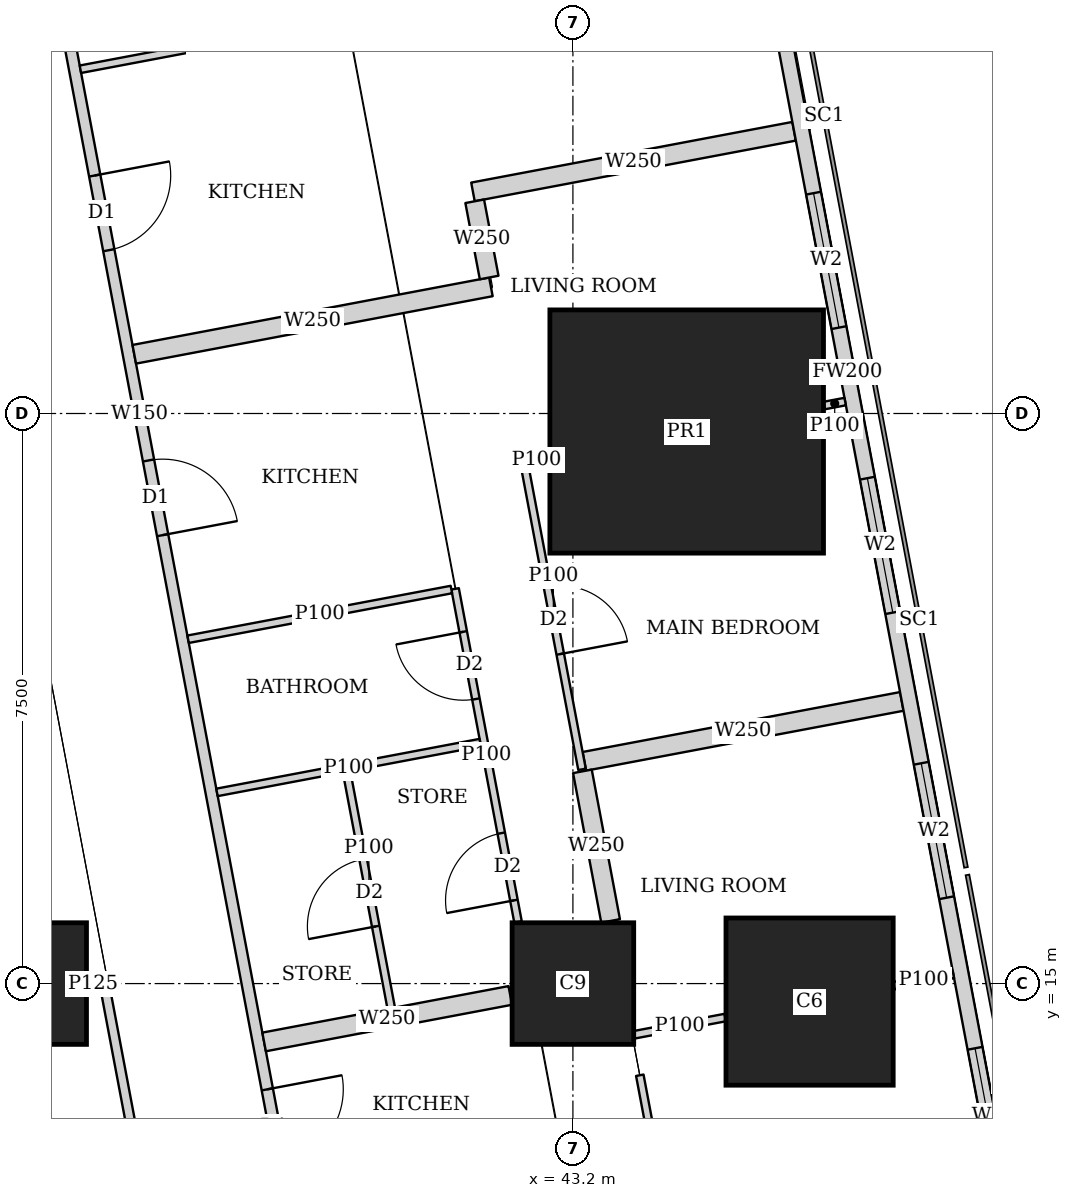
"""IFC4 building model, lengths in metres.
Left out: names, types, materials, properties, quantities, classifications, styles, units other than length and angle.
Written with IfcOpenShell. Run it as: python <this file> out.ifc"""

import sys

from ifc_helpers import new_model, si_unit, direction, frame, frame_2d, origin, origin_2d, place, context, subcontext, project, spatial, rectangle, extrude, element, fill, save


model = new_model("IFC4")
c1 = context("Model", 3, precision=1e-05, world=origin(), true_north=direction((0.0, 1.0)))
c2 = subcontext(c1, "Body", "Model", "MODEL_VIEW")
j1 = project(units=[si_unit("LENGTHUNIT", "METRE"), si_unit("PLANEANGLEUNIT", "RADIAN")], contexts=[c1])
p1 = place(None, origin())
s1 = spatial("IfcSite", under=j1, at=p1, CompositionType="ELEMENT")
p2 = place(p1, origin())
s2 = spatial("IfcBuilding", under=s1, at=p2, CompositionType="ELEMENT")
p3 = place(p2, frame((0.0, 0.0, 111.65)))
s3 = spatial("IfcBuildingStorey", under=s2, at=p3, CompositionType="ELEMENT", Elevation=111.65)
for number, where, z_axis, x_axis in (
    (1, (36.0, 15.0, 0.0), (0.0, 0.0, 1.0), (1.0, 0.0, 0.0)),
    (2, (43.2, 15.0, 0.0), (0.0, 0.0, 1.0), (1.0, 0.0, 0.0)),
):
    element("IfcColumn", number, at=place(p3, frame(where, z_axis=z_axis, x_axis=x_axis)), inside=s3, PredefinedType="COLUMN", context=c2, shape_type="SweptSolid", body=[
        extrude(rectangle(XDim=1.6, YDim=1.6, at=origin_2d()), origin(), (0.0, 0.0, 1.0), 3.75),
    ])
p4 = place(p3, frame((46.314, 14.763, 0.0), z_axis=(0.0, 0.0, 1.0), x_axis=(1.0, 0.0, 0.0)))
e3 = element("IfcColumn", 3, at=p4, inside=s3, PredefinedType="COLUMN", context=c2, shape_type="SweptSolid", body=[
    extrude(rectangle(XDim=2.2, YDim=2.2, at=origin_2d()), origin(), (0.0, 0.0, 1.0), 3.75),
])
p5 = place(p3, frame((44.697, 22.263, 0.0), z_axis=(0.0, 0.0, 1.0), x_axis=(1.0, 0.0, 0.0)))
e4 = element("IfcColumn", 4, at=p5, inside=s3, PredefinedType="COLUMN", context=c2, shape_type="SweptSolid", body=[
    extrude(rectangle(XDim=3.6, YDim=3.2, at=origin_2d()), origin(), (0.0, 0.0, 1.0), 3.75),
])
p6 = place(p3, frame((50.653, 2.703, 0.0), z_axis=(0.0, 0.0, 1.0), x_axis=(-0.185612026696, 0.982623109613, 0.0)))
e5 = element("IfcWall", 5, at=p6, inside=s3, PredefinedType="SOLIDWALL", context=c2, shape_type="SweptSolid", body=[
    extrude(rectangle(XDim=41.393, YDim=0.2, at=frame_2d((20.697, 0.0))), origin(), (0.0, 0.0, 1.0), 3.5),
])
p7 = place(p6, frame((1.633, 0.0, 0.9)))
e6 = element("IfcOpeningElement", 6, at=p7, cuts=e5, PredefinedType="OPENING", context=c2, shape_type="SweptSolid", body=[
    extrude(rectangle(XDim=1.8, YDim=1.5, at=frame_2d((0.9, 0.75))), frame((0.0, 0.11, 0.0), z_axis=(0.0, -1.0, 0.0), x_axis=(1.0, 0.0, 0.0)), (0.0, 0.0, 1.0), 0.22),
])
p8 = place(p6, frame((6.032, 0.0, 0.9)))
e7 = element("IfcOpeningElement", 7, at=p8, cuts=e5, PredefinedType="OPENING", context=c2, shape_type="SweptSolid", body=[
    extrude(rectangle(XDim=1.8, YDim=1.5, at=frame_2d((0.9, 0.75))), frame((0.0, 0.11, 0.0), z_axis=(0.0, -1.0, 0.0), x_axis=(1.0, 0.0, 0.0)), (0.0, 0.0, 1.0), 0.22),
])
p9 = place(p6, frame((9.848, 0.0, 0.9)))
e8 = element("IfcOpeningElement", 8, at=p9, cuts=e5, PredefinedType="OPENING", context=c2, shape_type="SweptSolid", body=[
    extrude(rectangle(XDim=1.8, YDim=1.5, at=frame_2d((0.9, 0.75))), frame((0.0, 0.11, 0.0), z_axis=(0.0, -1.0, 0.0), x_axis=(1.0, 0.0, 0.0)), (0.0, 0.0, 1.0), 0.22),
])
p10 = place(p6, frame((13.664, 0.0, 0.9)))
e9 = element("IfcOpeningElement", 9, at=p10, cuts=e5, PredefinedType="OPENING", context=c2, shape_type="SweptSolid", body=[
    extrude(rectangle(XDim=1.8, YDim=1.5, at=frame_2d((0.9, 0.75))), frame((0.0, 0.11, 0.0), z_axis=(0.0, -1.0, 0.0), x_axis=(1.0, 0.0, 0.0)), (0.0, 0.0, 1.0), 0.22),
])
p11 = place(p6, frame((17.481, 0.0, 0.9)))
e10 = element("IfcOpeningElement", 10, at=p11, cuts=e5, PredefinedType="OPENING", context=c2, shape_type="SweptSolid", body=[
    extrude(rectangle(XDim=1.8, YDim=1.5, at=frame_2d((0.9, 0.75))), frame((0.0, 0.11, 0.0), z_axis=(0.0, -1.0, 0.0), x_axis=(1.0, 0.0, 0.0)), (0.0, 0.0, 1.0), 0.22),
])
p12 = place(p6, frame((21.297, 0.0, 0.9)))
e11 = element("IfcOpeningElement", 11, at=p12, cuts=e5, PredefinedType="OPENING", context=c2, shape_type="SweptSolid", body=[
    extrude(rectangle(XDim=1.8, YDim=1.5, at=frame_2d((0.9, 0.75))), frame((0.0, 0.11, 0.0), z_axis=(0.0, -1.0, 0.0), x_axis=(1.0, 0.0, 0.0)), (0.0, 0.0, 1.0), 0.22),
])
p13 = place(p6, frame((25.113, 0.0, 0.9)))
e12 = element("IfcOpeningElement", 12, at=p13, cuts=e5, PredefinedType="OPENING", context=c2, shape_type="SweptSolid", body=[
    extrude(rectangle(XDim=1.8, YDim=1.5, at=frame_2d((0.9, 0.75))), frame((0.0, 0.11, 0.0), z_axis=(0.0, -1.0, 0.0), x_axis=(1.0, 0.0, 0.0)), (0.0, 0.0, 1.0), 0.22),
])
p14 = place(p6, frame((28.93, 0.0, 0.9)))
e13 = element("IfcOpeningElement", 13, at=p14, cuts=e5, PredefinedType="OPENING", context=c2, shape_type="SweptSolid", body=[
    extrude(rectangle(XDim=1.8, YDim=1.5, at=frame_2d((0.9, 0.75))), frame((0.0, 0.11, 0.0), z_axis=(0.0, -1.0, 0.0), x_axis=(1.0, 0.0, 0.0)), (0.0, 0.0, 1.0), 0.22),
])
p15 = place(p6, frame((32.746, 0.0, 0.9)))
e14 = element("IfcOpeningElement", 14, at=p15, cuts=e5, PredefinedType="OPENING", context=c2, shape_type="SweptSolid", body=[
    extrude(rectangle(XDim=1.8, YDim=1.5, at=frame_2d((0.9, 0.75))), frame((0.0, 0.11, 0.0), z_axis=(0.0, -1.0, 0.0), x_axis=(1.0, 0.0, 0.0)), (0.0, 0.0, 1.0), 0.22),
])
p16 = place(p6, frame((36.481, 0.0, 0.9)))
e15 = element("IfcOpeningElement", 15, at=p16, cuts=e5, PredefinedType="OPENING", context=c2, shape_type="SweptSolid", body=[
    extrude(rectangle(XDim=1.8, YDim=1.5, at=frame_2d((0.9, 0.75))), frame((0.0, 0.11, 0.0), z_axis=(0.0, -1.0, 0.0), x_axis=(1.0, 0.0, 0.0)), (0.0, 0.0, 1.0), 0.22),
])
p17 = place(p3, frame((33.127, 45.65, 0.0), z_axis=(0.0, 0.0, 1.0), x_axis=(0.185598547723, -0.98262565562, 0.0)))
e16 = element("IfcWall", 16, at=p17, inside=s3, PredefinedType="SOLIDWALL", context=c2, shape_type="SweptSolid", body=[
    extrude(rectangle(XDim=47.118, YDim=0.15, at=frame_2d((23.559, 0.0))), origin(), (0.0, 0.0, 1.0), 2.2),
])
p18 = place(p17, frame((20.373, 0.0, 0.0)))
e17 = element("IfcOpeningElement", 17, at=p18, cuts=e16, PredefinedType="OPENING", context=c2, shape_type="SweptSolid", body=[
    extrude(rectangle(XDim=1.0, YDim=2.1, at=frame_2d((0.5, 1.05))), frame((0.0, 0.085, 0.0), z_axis=(0.0, -1.0, 0.0), x_axis=(1.0, 0.0, 0.0)), (0.0, 0.0, 1.0), 0.17),
])
p19 = place(p17, frame((24.188, 0.0, 0.0)))
e18 = element("IfcOpeningElement", 18, at=p19, cuts=e16, PredefinedType="OPENING", context=c2, shape_type="SweptSolid", body=[
    extrude(rectangle(XDim=1.0, YDim=2.1, at=frame_2d((0.5, 1.05))), frame((0.0, 0.085, 0.0), z_axis=(0.0, -1.0, 0.0), x_axis=(1.0, 0.0, 0.0)), (0.0, 0.0, 1.0), 0.17),
])
p20 = place(p17, frame((32.608, 0.0, 0.0)))
e19 = element("IfcOpeningElement", 19, at=p20, cuts=e16, PredefinedType="OPENING", context=c2, shape_type="SweptSolid", body=[
    extrude(rectangle(XDim=1.0, YDim=2.1, at=frame_2d((0.5, 1.05))), frame((0.0, 0.085, 0.0), z_axis=(0.0, -1.0, 0.0), x_axis=(1.0, 0.0, 0.0)), (0.0, 0.0, 1.0), 0.17),
])
p21 = place(p3, frame((40.233, 27.693, 0.0), z_axis=(0.0, 0.0, 1.0), x_axis=(-0.982598214409, -0.185743772548, 0.0)))
e20 = element("IfcWall", 20, at=p21, inside=s3, PredefinedType="PARTITIONING", context=c2, shape_type="SweptSolid", body=[
    extrude(rectangle(XDim=3.575, YDim=0.1, at=frame_2d((1.788, 0.0))), origin(), (0.0, 0.0, 1.0), 3.5),
])
p22 = place(p3, frame((42.565, 21.809, 0.0), z_axis=(0.0, 0.0, 1.0), x_axis=(0.185910488551, -0.982566684885, 0.0)))
e21 = element("IfcWall", 21, at=p22, inside=s3, PredefinedType="PARTITIONING", context=c2, shape_type="SweptSolid", body=[
    extrude(rectangle(XDim=4.062, YDim=0.1, at=frame_2d((2.031, 0.0))), origin(), (0.0, 0.0, 1.0), 2.5),
])
p23 = place(p22, frame((1.618, 0.0, 0.0)))
e22 = element("IfcOpeningElement", 22, at=p23, cuts=e21, PredefinedType="OPENING", context=c2, shape_type="SweptSolid", body=[
    extrude(rectangle(XDim=0.9, YDim=2.1, at=frame_2d((0.45, 1.05))), frame((0.0, 0.06, 0.0), z_axis=(0.0, -1.0, 0.0), x_axis=(1.0, 0.0, 0.0)), (0.0, 0.0, 1.0), 0.12),
])
p24 = place(p3, frame((41.65, 20.193, 0.0), z_axis=(0.0, 0.0, 1.0), x_axis=(0.18565316258, -0.982615338382, 0.0)))
e23 = element("IfcWall", 23, at=p24, inside=s3, PredefinedType="PARTITIONING", context=c2, shape_type="SweptSolid", body=[
    extrude(rectangle(XDim=4.461, YDim=0.1, at=frame_2d((2.23, 0.0))), origin(), (0.0, 0.0, 1.0), 3.5),
])
p25 = place(p24, frame((0.575, 0.0, 0.0)))
e24 = element("IfcOpeningElement", 24, at=p25, cuts=e23, PredefinedType="OPENING", context=c2, shape_type="SweptSolid", body=[
    extrude(rectangle(XDim=0.9, YDim=2.1, at=frame_2d((0.45, 1.05))), frame((0.0, 0.06, 0.0), z_axis=(0.0, -1.0, 0.0), x_axis=(1.0, 0.0, 0.0)), (0.0, 0.0, 1.0), 0.12),
])
p26 = place(p24, frame((3.271, 0.0, 0.0)))
e25 = element("IfcOpeningElement", 25, at=p26, cuts=e23, PredefinedType="OPENING", context=c2, shape_type="SweptSolid", body=[
    extrude(rectangle(XDim=0.9, YDim=2.1, at=frame_2d((0.45, 1.05))), frame((0.0, 0.06, 0.0), z_axis=(0.0, -1.0, 0.0), x_axis=(1.0, 0.0, 0.0)), (0.0, 0.0, 1.0), 0.12),
])
p27 = place(p3, frame((46.782, 22.657, 0.0), z_axis=(0.0, 0.0, 1.0), x_axis=(-0.982574553168, -0.185868898601, 0.0)))
e26 = element("IfcWall", 26, at=p27, inside=s3, PredefinedType="PARTITIONING", context=c2, shape_type="SweptSolid", body=[
    extrude(rectangle(XDim=0.28, YDim=0.1, at=frame_2d((0.14, 0.0))), origin(), (0.0, 0.0, 1.0), 3.5),
])
p28 = place(p3, frame((42.887, 21.921, 0.0), z_axis=(0.0, 0.0, 1.0), x_axis=(-0.982274918032, -0.187445953293, 0.0)))
e27 = element("IfcWall", 27, at=p28, inside=s3, PredefinedType="PARTITIONING", context=c2, shape_type="SweptSolid", body=[
    extrude(rectangle(XDim=0.336, YDim=0.1, at=frame_2d((0.168, 0.0))), origin(), (0.0, 0.0, 1.0), 2.5),
])
p29 = place(p3, frame((41.601, 20.184, 0.0), z_axis=(0.0, 0.0, 1.0), x_axis=(-0.982638553676, -0.185530247748, 0.0)))
e28 = element("IfcWall", 28, at=p29, inside=s3, PredefinedType="PARTITIONING", context=c2, shape_type="SweptSolid", body=[
    extrude(rectangle(XDim=3.525, YDim=0.1, at=frame_2d((1.763, 0.0))), origin(), (0.0, 0.0, 1.0), 3.5),
])
p30 = place(p3, frame((41.981, 18.17, 0.0), z_axis=(0.0, 0.0, 1.0), x_axis=(-0.982585626838, -0.185810349366, 0.0)))
e29 = element("IfcWall", 29, at=p30, inside=s3, PredefinedType="PARTITIONING", context=c2, shape_type="SweptSolid", body=[
    extrude(rectangle(XDim=3.525, YDim=0.1, at=frame_2d((1.763, 0.0))), origin(), (0.0, 0.0, 1.0), 3.5),
])
p31 = place(p3, frame((46.11, 26.213, 0.0), z_axis=(0.0, 0.0, 1.0), x_axis=(-0.982633535512, -0.185556823879, 0.0)))
e30 = element("IfcWall", 30, at=p31, inside=s3, PredefinedType="SOLIDWALL", context=c2, shape_type="SweptSolid", body=[
    extrude(rectangle(XDim=4.3, YDim=0.25, at=frame_2d((2.15, 0.0))), origin(), (0.0, 0.0, 1.0), 2.2),
])
p32 = place(p3, frame((42.121, 24.166, 0.0), z_axis=(0.0, 0.0, 1.0), x_axis=(-0.98259850169, -0.185742252804, 0.0)))
e31 = element("IfcWall", 31, at=p32, inside=s3, PredefinedType="SOLIDWALL", context=c2, shape_type="SweptSolid", body=[
    extrude(rectangle(XDim=4.775, YDim=0.25, at=frame_2d((2.388, 0.0))), origin(), (0.0, 0.0, 1.0), 3.5),
])
p33 = place(p3, frame((41.908, 25.292, 0.0), z_axis=(0.0, 0.0, 1.0), x_axis=(0.18607888991, -0.982534806879, 0.0)))
e32 = element("IfcWall", 32, at=p33, inside=s3, PredefinedType="SOLIDWALL", context=c2, shape_type="SweptSolid", body=[
    extrude(rectangle(XDim=1.021, YDim=0.25, at=frame_2d((0.51, 0.0))), origin(), (0.0, 0.0, 1.0), 3.5),
])
p34 = place(p3, frame((44.08, 13.794, 0.0), z_axis=(0.0, 0.0, 1.0), x_axis=(0.185608455357, -0.982623784212, 0.0)))
e33 = element("IfcWall", 33, at=p34, inside=s3, PredefinedType="PARTITIONING", context=c2, shape_type="SweptSolid", body=[
    extrude(rectangle(XDim=10.909, YDim=0.1, at=frame_2d((5.455, 0.0))), origin(), (0.0, 0.0, 1.0), 3.5),
])
p35 = place(p34, frame((1.094, 0.0, 0.0)))
e34 = element("IfcOpeningElement", 34, at=p35, cuts=e33, PredefinedType="OPENING", context=c2, shape_type="SweptSolid", body=[
    extrude(rectangle(XDim=0.9, YDim=2.1, at=frame_2d((0.45, 1.05))), frame((0.0, 0.06, 0.0), z_axis=(0.0, -1.0, 0.0), x_axis=(1.0, 0.0, 0.0)), (0.0, 0.0, 1.0), 0.12),
])
p36 = place(p34, frame((3.639, 0.0, 0.0)))
e35 = element("IfcOpeningElement", 35, at=p36, cuts=e33, PredefinedType="OPENING", context=c2, shape_type="SweptSolid", body=[
    extrude(rectangle(XDim=0.9, YDim=2.1, at=frame_2d((0.45, 1.05))), frame((0.0, 0.06, 0.0), z_axis=(0.0, -1.0, 0.0), x_axis=(1.0, 0.0, 0.0)), (0.0, 0.0, 1.0), 0.12),
])
p37 = place(p34, frame((8.05, 0.0, 0.0)))
e36 = element("IfcOpeningElement", 36, at=p37, cuts=e33, PredefinedType="OPENING", context=c2, shape_type="SweptSolid", body=[
    extrude(rectangle(XDim=0.9, YDim=2.1, at=frame_2d((0.45, 1.05))), frame((0.0, 0.06, 0.0), z_axis=(0.0, -1.0, 0.0), x_axis=(1.0, 0.0, 0.0)), (0.0, 0.0, 1.0), 0.12),
])
p38 = place(p3, frame((48.206, 15.12, 0.0), z_axis=(0.0, 0.0, 1.0), x_axis=(-0.982512656401, -0.186195810938, 0.0)))
e37 = element("IfcWall", 37, at=p38, inside=s3, PredefinedType="PARTITIONING", context=c2, shape_type="SweptSolid", body=[
    extrude(rectangle(XDim=0.796, YDim=0.1, at=frame_2d((0.398, 0.0))), origin(), (0.0, 0.0, 1.0), 3.5),
])
p39 = place(p3, frame((45.204, 14.553, 0.0), z_axis=(0.0, 0.0, 1.0), x_axis=(-0.982545444659, -0.186022711461, 0.0)))
e38 = element("IfcWall", 38, at=p39, inside=s3, PredefinedType="PARTITIONING", context=c2, shape_type="SweptSolid", body=[
    extrude(rectangle(XDim=1.215, YDim=0.1, at=frame_2d((0.608, 0.0))), origin(), (0.0, 0.0, 1.0), 3.5),
])
p40 = place(p3, frame((47.527, 18.712, 0.0), z_axis=(0.0, 0.0, 1.0), x_axis=(-0.982665405803, -0.185387972203, 0.0)))
e39 = element("IfcWall", 39, at=p40, inside=s3, PredefinedType="SOLIDWALL", context=c2, shape_type="SweptSolid", body=[
    extrude(rectangle(XDim=4.25, YDim=0.25, at=frame_2d((2.125, 0.0))), origin(), (0.0, 0.0, 1.0), 2.2),
])
p41 = place(p3, frame((42.376, 14.844, 0.0), z_axis=(0.0, 0.0, 1.0), x_axis=(-0.982610440948, -0.18567908159, 0.0)))
e40 = element("IfcWall", 40, at=p41, inside=s3, PredefinedType="SOLIDWALL", context=c2, shape_type="SweptSolid", body=[
    extrude(rectangle(XDim=3.296, YDim=0.25, at=frame_2d((1.648, 0.0))), origin(), (0.0, 0.0, 1.0), 3.5),
])
p42 = place(p3, frame((43.325, 17.792, 0.0), z_axis=(0.0, 0.0, 1.0), x_axis=(0.185296805985, -0.982682600686, 0.0)))
e41 = element("IfcWall", 41, at=p42, inside=s3, PredefinedType="SOLIDWALL", context=c2, shape_type="SweptSolid", body=[
    extrude(rectangle(XDim=2.003, YDim=0.25, at=frame_2d((1.001, 0.0))), origin(), (0.0, 0.0, 1.0), 3.5),
])
p43 = place(p3, frame((40.222, 17.786, 0.0), z_axis=(0.0, 0.0, 1.0), x_axis=(0.185768925106, -0.982593459405, 0.0)))
e42 = element("IfcWall", 42, at=p43, inside=s3, PredefinedType="PARTITIONING", context=c2, shape_type="SweptSolid", body=[
    extrude(rectangle(XDim=3.166, YDim=0.1, at=frame_2d((1.583, 0.0))), origin(), (0.0, 0.0, 1.0), 3.5),
])
p44 = place(p43, frame((1.17, 0.0, 0.0)))
e43 = element("IfcOpeningElement", 43, at=p44, cuts=e42, PredefinedType="OPENING", context=c2, shape_type="SweptSolid", body=[
    extrude(rectangle(XDim=0.9, YDim=2.1, at=frame_2d((0.45, 1.05))), frame((0.0, 0.06, 0.0), z_axis=(0.0, -1.0, 0.0), x_axis=(1.0, 0.0, 0.0)), (0.0, 0.0, 1.0), 0.12),
])
p45 = place(p3, frame((37.9, 10.413, 0.0), z_axis=(0.0, 0.0, 1.0), x_axis=(-0.185513629891, 0.982641691119, 0.0)))
e44 = element("IfcWall", 44, at=p45, inside=s3, PredefinedType="PARTITIONING", context=c2, shape_type="SweptSolid", body=[
    extrude(rectangle(XDim=4.668, YDim=0.125, at=frame_2d((2.334, 0.0))), origin(), (0.0, 0.0, 1.0), 3.5),
])
p46 = place(p45, frame((0.708, 0.0, 0.0)))
e45 = element("IfcOpeningElement", 45, at=p46, cuts=e44, PredefinedType="OPENING", context=c2, shape_type="SweptSolid", body=[
    extrude(rectangle(XDim=1.0, YDim=2.1, at=frame_2d((0.5, 1.05))), frame((0.0, 0.073, 0.0), z_axis=(0.0, -1.0, 0.0), x_axis=(1.0, 0.0, 0.0)), (0.0, 0.0, 1.0), 0.145),
])
p47 = place(p3, frame((36.801, 15.0, 0.0), z_axis=(0.0, 0.0, 1.0), x_axis=(1.0, 0.0, 0.0)))
e46 = element("IfcWall", 46, at=p47, inside=s3, PredefinedType="PARTITIONING", context=c2, shape_type="SweptSolid", body=[
    extrude(rectangle(XDim=0.172, YDim=0.125, at=frame_2d((0.086, 0.0))), origin(), (0.0, 0.0, 1.0), 3.5),
])
p48 = place(p9, origin())
e47 = element("IfcWindow", 47, at=p48, inside=s3, PartitioningType="SINGLE_PANEL", PredefinedType="WINDOW", context=c2, shape_type="SweptSolid", body=[
    extrude(rectangle(XDim=1.8, YDim=1.5, at=frame_2d((0.9, 0.75))), frame((0.0, 0.03, 0.0), z_axis=(0.0, -1.0, 0.0), x_axis=(1.0, 0.0, 0.0)), (0.0, 0.0, 1.0), 0.06),
])
fill(e8, e47)
p49 = place(p10, origin())
e48 = element("IfcWindow", 48, at=p49, inside=s3, PartitioningType="SINGLE_PANEL", PredefinedType="WINDOW", context=c2, shape_type="SweptSolid", body=[
    extrude(rectangle(XDim=1.8, YDim=1.5, at=frame_2d((0.9, 0.75))), frame((0.0, 0.03, 0.0), z_axis=(0.0, -1.0, 0.0), x_axis=(1.0, 0.0, 0.0)), (0.0, 0.0, 1.0), 0.06),
])
fill(e9, e48)
p50 = place(p11, origin())
e49 = element("IfcWindow", 49, at=p50, inside=s3, PartitioningType="SINGLE_PANEL", PredefinedType="WINDOW", context=c2, shape_type="SweptSolid", body=[
    extrude(rectangle(XDim=1.8, YDim=1.5, at=frame_2d((0.9, 0.75))), frame((0.0, 0.03, 0.0), z_axis=(0.0, -1.0, 0.0), x_axis=(1.0, 0.0, 0.0)), (0.0, 0.0, 1.0), 0.06),
])
fill(e10, e49)
p51 = place(p12, origin())
e50 = element("IfcWindow", 50, at=p51, inside=s3, PartitioningType="SINGLE_PANEL", PredefinedType="WINDOW", context=c2, shape_type="SweptSolid", body=[
    extrude(rectangle(XDim=1.8, YDim=1.5, at=frame_2d((0.9, 0.75))), frame((0.0, 0.03, 0.0), z_axis=(0.0, -1.0, 0.0), x_axis=(1.0, 0.0, 0.0)), (0.0, 0.0, 1.0), 0.06),
])
fill(e11, e50)
p52 = place(p18, origin())
e51 = element("IfcDoor", 51, at=p52, inside=s3, OperationType="SINGLE_SWING_LEFT", PredefinedType="DOOR", context=c2, shape_type="SweptSolid", body=[
    extrude(rectangle(XDim=1.0, YDim=2.1, at=frame_2d((0.5, 1.05))), frame((0.0, 0.025, 0.0), z_axis=(0.0, -1.0, 0.0), x_axis=(1.0, 0.0, 0.0)), (0.0, 0.0, 1.0), 0.05),
])
fill(e17, e51)
p53 = place(p23, origin())
e52 = element("IfcDoor", 52, at=p53, inside=s3, OperationType="SINGLE_SWING_RIGHT", PredefinedType="DOOR", context=c2, shape_type="SweptSolid", body=[
    extrude(rectangle(XDim=0.9, YDim=2.1, at=frame_2d((0.45, 1.05))), frame((0.0, 0.025, 0.0), z_axis=(0.0, -1.0, 0.0), x_axis=(1.0, 0.0, 0.0)), (0.0, 0.0, 1.0), 0.05),
])
fill(e22, e52)
p54 = place(p25, origin())
e53 = element("IfcDoor", 53, at=p54, inside=s3, OperationType="SINGLE_SWING_RIGHT", PredefinedType="DOOR", context=c2, shape_type="SweptSolid", body=[
    extrude(rectangle(XDim=0.9, YDim=2.1, at=frame_2d((0.45, 1.05))), frame((0.0, 0.025, 0.0), z_axis=(0.0, -1.0, 0.0), x_axis=(1.0, 0.0, 0.0)), (0.0, 0.0, 1.0), 0.05),
])
fill(e24, e53)
p55 = place(p26, origin())
e54 = element("IfcDoor", 54, at=p55, inside=s3, OperationType="SINGLE_SWING_LEFT", PredefinedType="DOOR", context=c2, shape_type="SweptSolid", body=[
    extrude(rectangle(XDim=0.9, YDim=2.1, at=frame_2d((0.45, 1.05))), frame((0.0, 0.025, 0.0), z_axis=(0.0, -1.0, 0.0), x_axis=(1.0, 0.0, 0.0)), (0.0, 0.0, 1.0), 0.05),
])
fill(e25, e54)
p56 = place(p19, origin())
e55 = element("IfcDoor", 55, at=p56, inside=s3, OperationType="SINGLE_SWING_RIGHT", PredefinedType="DOOR", context=c2, shape_type="SweptSolid", body=[
    extrude(rectangle(XDim=1.0, YDim=2.1, at=frame_2d((0.5, 1.05))), frame((0.0, 0.025, 0.0), z_axis=(0.0, -1.0, 0.0), x_axis=(1.0, 0.0, 0.0)), (0.0, 0.0, 1.0), 0.05),
])
fill(e18, e55)
p57 = place(p20, origin())
e56 = element("IfcDoor", 56, at=p57, inside=s3, OperationType="SINGLE_SWING_LEFT", PredefinedType="DOOR", context=c2, shape_type="SweptSolid", body=[
    extrude(rectangle(XDim=1.0, YDim=2.1, at=frame_2d((0.5, 1.05))), frame((0.0, 0.025, 0.0), z_axis=(0.0, -1.0, 0.0), x_axis=(1.0, 0.0, 0.0)), (0.0, 0.0, 1.0), 0.05),
])
fill(e19, e56)
p58 = place(p44, origin())
e57 = element("IfcDoor", 57, at=p58, inside=s3, OperationType="SINGLE_SWING_LEFT", PredefinedType="DOOR", context=c2, shape_type="SweptSolid", body=[
    extrude(rectangle(XDim=0.9, YDim=2.1, at=frame_2d((0.45, 1.05))), frame((0.0, 0.025, 0.0), z_axis=(0.0, -1.0, 0.0), x_axis=(1.0, 0.0, 0.0)), (0.0, 0.0, 1.0), 0.05),
])
fill(e43, e57)
save(model, sys.argv[1])
